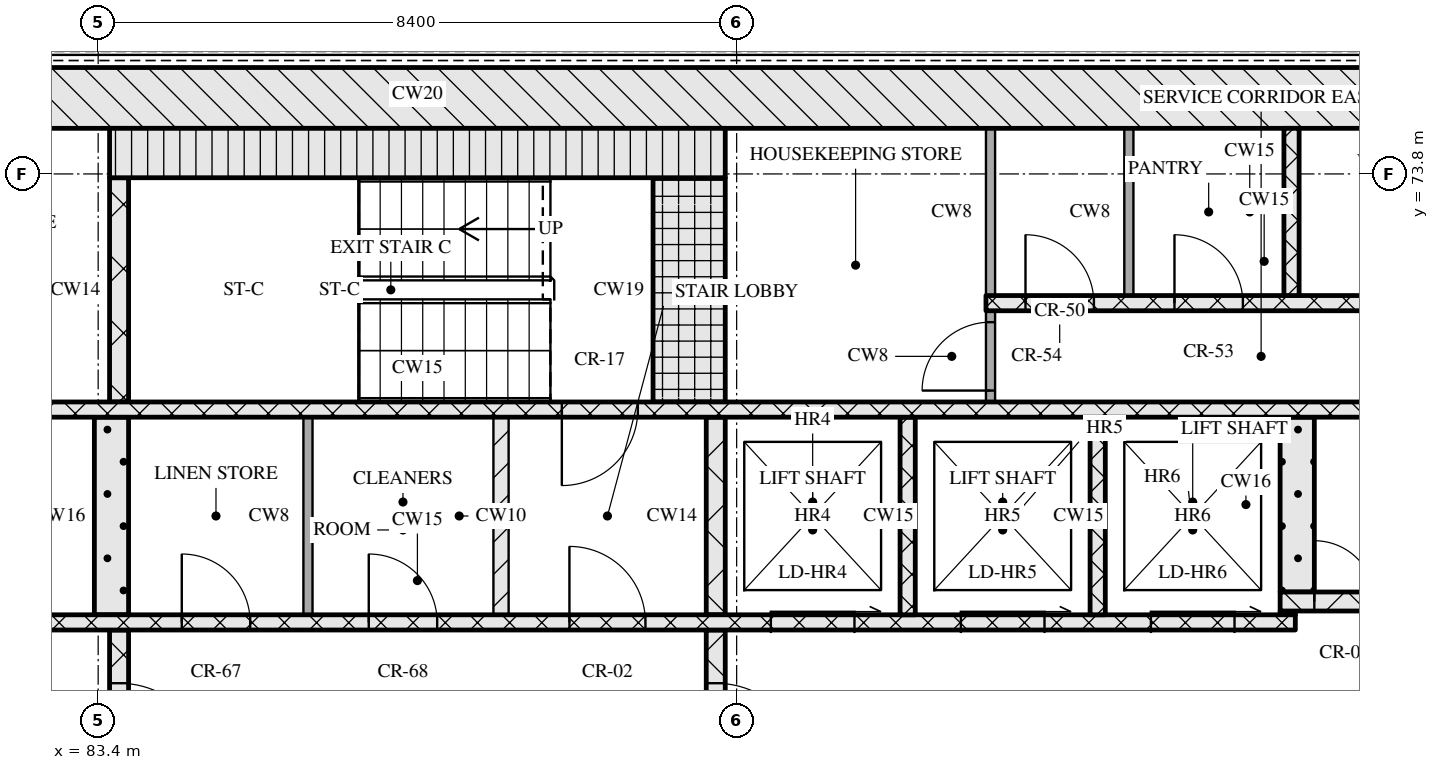
"""IFC4 building model, lengths in metres.
Left out: names, types, materials, properties, quantities, classifications, styles, units other than length and angle.
Written with IfcOpenShell. Run it as: python <this file> out.ifc"""

import sys

from ifc_helpers import new_model, si_unit, direction, frame, frame_2d, origin, place, context, subcontext, project, spatial, rectangle, extrude, element, fill, save


model = new_model("IFC4")
c1 = context("Model", 3, precision=1e-05, world=origin(), true_north=direction((0.0, 1.0)))
c2 = subcontext(c1, "Body", "Model", "MODEL_VIEW")
j1 = project(units=[si_unit("LENGTHUNIT", "METRE"), si_unit("PLANEANGLEUNIT", "RADIAN")], contexts=[c1])
p1 = place(None, origin())
s1 = spatial("IfcSite", under=j1, at=p1, CompositionType="ELEMENT")
p2 = place(p1, origin())
s2 = spatial("IfcBuilding", under=s1, at=p2, CompositionType="ELEMENT")
p3 = place(p2, frame((0.0, 0.0, 176.25)))
s3 = spatial("IfcBuildingStorey", under=s2, at=p3, CompositionType="ELEMENT", Elevation=176.25)
p4 = place(p3, frame((67.0, 74.8, 0.0), z_axis=(0.0, 0.0, 1.0), x_axis=(1.0, 0.0, 0.0)))
e1 = element("IfcWall", 1, at=p4, inside=s3, PredefinedType="SOLIDWALL", context=c2, shape_type="SweptSolid", body=[
    extrude(rectangle(XDim=41.2, YDim=0.8, at=frame_2d((20.6, 0.0))), origin(), (0.0, 0.0, 1.0), 3.32),
])
p5 = place(p3, frame((83.675, 65.2, 0.0), z_axis=(0.0, 0.0, 1.0), x_axis=(0.0, 1.0, 0.0)))
e2 = element("IfcWall", 2, at=p5, inside=s3, PredefinedType="SOLIDWALL", context=c2, shape_type="SweptSolid", body=[
    extrude(rectangle(XDim=2.6, YDim=0.25, at=frame_2d((1.3, 0.0))), origin(), (0.0, 0.0, 1.0), 3.32),
])
p6 = place(p5, frame((0.7, 0.0, 0.0)))
e3 = element("IfcOpeningElement", 3, at=p6, cuts=e2, PredefinedType="OPENING", context=c2, shape_type="SweptSolid", body=[
    extrude(rectangle(XDim=1.2, YDim=2.1, at=frame_2d((0.6, 1.05))), frame((0.0, 0.135, 0.0), z_axis=(0.0, -1.0, 0.0), x_axis=(1.0, 0.0, 0.0)), (0.0, 0.0, 1.0), 0.27),
])
p7 = place(p3, frame((91.525, 65.2, 0.0), z_axis=(0.0, 0.0, 1.0), x_axis=(0.0, 1.0, 0.0)))
e4 = element("IfcWall", 4, at=p7, inside=s3, PredefinedType="SOLIDWALL", context=c2, shape_type="SweptSolid", body=[
    extrude(rectangle(XDim=2.6, YDim=0.25, at=frame_2d((1.3, 0.0))), origin(), (0.0, 0.0, 1.0), 3.32),
])
p8 = place(p7, frame((0.7, 0.0, 0.0)))
e5 = element("IfcOpeningElement", 5, at=p8, cuts=e4, PredefinedType="OPENING", context=c2, shape_type="SweptSolid", body=[
    extrude(rectangle(XDim=1.2, YDim=2.1, at=frame_2d((0.6, 1.05))), frame((0.0, 0.135, 0.0), z_axis=(0.0, -1.0, 0.0), x_axis=(1.0, 0.0, 0.0)), (0.0, 0.0, 1.0), 0.27),
])
p9 = place(p3, frame((76.05, 67.9, 0.0), z_axis=(0.0, 0.0, 1.0), x_axis=(1.0, 0.0, 0.0)))
e6 = element("IfcWall", 6, at=p9, inside=s3, PredefinedType="SOLIDWALL", context=c2, shape_type="SweptSolid", body=[
    extrude(rectangle(XDim=23.1, YDim=0.2, at=frame_2d((11.55, 0.0))), origin(), (0.0, 0.0, 1.0), 3.32),
])
p10 = place(p9, frame((1.35, 0.0, 0.0)))
e7 = element("IfcOpeningElement", 7, at=p10, cuts=e6, PredefinedType="OPENING", context=c2, shape_type="SweptSolid", body=[
    extrude(rectangle(XDim=0.9, YDim=2.1, at=frame_2d((0.45, 1.05))), frame((0.0, 0.11, 0.0), z_axis=(0.0, -1.0, 0.0), x_axis=(1.0, 0.0, 0.0)), (0.0, 0.0, 1.0), 0.22),
])
p11 = place(p9, frame((5.06, 0.0, 0.0)))
e8 = element("IfcOpeningElement", 8, at=p11, cuts=e6, PredefinedType="OPENING", context=c2, shape_type="SweptSolid", body=[
    extrude(rectangle(XDim=0.9, YDim=2.1, at=frame_2d((0.45, 1.05))), frame((0.0, 0.11, 0.0), z_axis=(0.0, -1.0, 0.0), x_axis=(1.0, 0.0, 0.0)), (0.0, 0.0, 1.0), 0.22),
])
p12 = place(p9, frame((8.45, 0.0, 0.0)))
e9 = element("IfcOpeningElement", 9, at=p12, cuts=e6, PredefinedType="OPENING", context=c2, shape_type="SweptSolid", body=[
    extrude(rectangle(XDim=0.9, YDim=2.1, at=frame_2d((0.45, 1.05))), frame((0.0, 0.11, 0.0), z_axis=(0.0, -1.0, 0.0), x_axis=(1.0, 0.0, 0.0)), (0.0, 0.0, 1.0), 0.22),
])
p13 = place(p9, frame((10.91, 0.0, 0.0)))
e10 = element("IfcOpeningElement", 10, at=p13, cuts=e6, PredefinedType="OPENING", context=c2, shape_type="SweptSolid", body=[
    extrude(rectangle(XDim=0.9, YDim=2.1, at=frame_2d((0.45, 1.05))), frame((0.0, 0.11, 0.0), z_axis=(0.0, -1.0, 0.0), x_axis=(1.0, 0.0, 0.0)), (0.0, 0.0, 1.0), 0.22),
])
p14 = place(p9, frame((13.55, 0.0, 0.0)))
e11 = element("IfcOpeningElement", 11, at=p14, cuts=e6, PredefinedType="OPENING", context=c2, shape_type="SweptSolid", body=[
    extrude(rectangle(XDim=1.0, YDim=2.1, at=frame_2d((0.5, 1.05))), frame((0.0, 0.11, 0.0), z_axis=(0.0, -1.0, 0.0), x_axis=(1.0, 0.0, 0.0)), (0.0, 0.0, 1.0), 0.22),
])
p15 = place(p9, frame((16.2, 0.0, 0.0)))
e12 = element("IfcOpeningElement", 12, at=p15, cuts=e6, PredefinedType="OPENING", context=c2, shape_type="SweptSolid", body=[
    extrude(rectangle(XDim=1.1, YDim=2.1, at=frame_2d((0.55, 1.05))), frame((0.0, 0.11, 0.0), z_axis=(0.0, -1.0, 0.0), x_axis=(1.0, 0.0, 0.0)), (0.0, 0.0, 1.0), 0.22),
])
p16 = place(p9, frame((18.7, 0.0, 0.0)))
e13 = element("IfcOpeningElement", 13, at=p16, cuts=e6, PredefinedType="OPENING", context=c2, shape_type="SweptSolid", body=[
    extrude(rectangle(XDim=1.1, YDim=2.1, at=frame_2d((0.55, 1.05))), frame((0.0, 0.11, 0.0), z_axis=(0.0, -1.0, 0.0), x_axis=(1.0, 0.0, 0.0)), (0.0, 0.0, 1.0), 0.22),
])
p17 = place(p9, frame((21.2, 0.0, 0.0)))
e14 = element("IfcOpeningElement", 14, at=p17, cuts=e6, PredefinedType="OPENING", context=c2, shape_type="SweptSolid", body=[
    extrude(rectangle(XDim=1.1, YDim=2.1, at=frame_2d((0.55, 1.05))), frame((0.0, 0.11, 0.0), z_axis=(0.0, -1.0, 0.0), x_axis=(1.0, 0.0, 0.0)), (0.0, 0.0, 1.0), 0.22),
])
p18 = place(p3, frame((83.575, 68.0, 0.0), z_axis=(0.0, 0.0, 1.0), x_axis=(0.0, 1.0, 0.0)))
e15 = element("IfcWall", 15, at=p18, inside=s3, PredefinedType="SOLIDWALL", context=c2, shape_type="SweptSolid", body=[
    extrude(rectangle(XDim=2.6, YDim=0.45, at=frame_2d((1.3, 0.0))), origin(), (0.0, 0.0, 1.0), 3.32),
])
p19 = place(p3, frame((86.16, 68.0, 0.0), z_axis=(0.0, 0.0, 1.0), x_axis=(0.0, 1.0, 0.0)))
e16 = element("IfcWall", 16, at=p19, inside=s3, PredefinedType="PARTITIONING", context=c2, shape_type="SweptSolid", body=[
    extrude(rectangle(XDim=2.6, YDim=0.12, at=frame_2d((1.3, 0.0))), origin(), (0.0, 0.0, 1.0), 3.32),
])
p20 = place(p3, frame((88.7, 68.0, 0.0), z_axis=(0.0, 0.0, 1.0), x_axis=(0.0, 1.0, 0.0)))
e17 = element("IfcWall", 17, at=p20, inside=s3, PredefinedType="PARTITIONING", context=c2, shape_type="SweptSolid", body=[
    extrude(rectangle(XDim=2.6, YDim=0.2, at=frame_2d((1.3, 0.0))), origin(), (0.0, 0.0, 1.0), 3.32),
])
p21 = place(p3, frame((91.525, 68.0, 0.0), z_axis=(0.0, 0.0, 1.0), x_axis=(0.0, 1.0, 0.0)))
e18 = element("IfcWall", 18, at=p21, inside=s3, PredefinedType="SOLIDWALL", context=c2, shape_type="SweptSolid", body=[
    extrude(rectangle(XDim=2.6, YDim=0.25, at=frame_2d((1.3, 0.0))), origin(), (0.0, 0.0, 1.0), 3.32),
])
for number, where, z_axis, x_axis in (
    (19, (94.05, 68.0, 0.0), (0.0, 0.0, 1.0), (0.0, 1.0, 0.0)),
    (20, (96.55, 68.0, 0.0), (0.0, 0.0, 1.0), (0.0, 1.0, 0.0)),
):
    element("IfcWall", number, at=place(p3, frame(where, z_axis=z_axis, x_axis=x_axis)), inside=s3, PredefinedType="SOLIDWALL", context=c2, shape_type="SweptSolid", body=[
        extrude(rectangle(XDim=2.6, YDim=0.2, at=frame_2d((1.3, 0.0))), origin(), (0.0, 0.0, 1.0), 3.32),
    ])
p22 = place(p3, frame((98.95, 68.025, 0.0), z_axis=(0.0, 0.0, 1.0), x_axis=(1.0, 0.0, 0.0)))
e21 = element("IfcWall", 21, at=p22, inside=s3, PredefinedType="SOLIDWALL", context=c2, shape_type="SweptSolid", body=[
    extrude(rectangle(XDim=0.2, YDim=0.05, at=frame_2d((0.1, 0.0))), origin(), (0.0, 0.0, 1.0), 3.32),
])
p23 = place(p3, frame((98.95, 68.175, 0.0), z_axis=(0.0, 0.0, 1.0), x_axis=(1.0, 0.0, 0.0)))
e22 = element("IfcWall", 22, at=p23, inside=s3, PredefinedType="SOLIDWALL", context=c2, shape_type="SweptSolid", body=[
    extrude(rectangle(XDim=8.45, YDim=0.25, at=frame_2d((4.225, 0.0))), origin(), (0.0, 0.0, 1.0), 3.32),
])
p24 = place(p23, frame((0.45, 0.0, 0.0)))
e23 = element("IfcOpeningElement", 23, at=p24, cuts=e22, PredefinedType="OPENING", context=c2, shape_type="SweptSolid", body=[
    extrude(rectangle(XDim=0.8, YDim=2.1, at=frame_2d((0.4, 1.05))), frame((0.0, 0.135, 0.0), z_axis=(0.0, -1.0, 0.0), x_axis=(1.0, 0.0, 0.0)), (0.0, 0.0, 1.0), 0.27),
])
p25 = place(p23, frame((1.75, 0.0, 0.0)))
e24 = element("IfcOpeningElement", 24, at=p25, cuts=e22, PredefinedType="OPENING", context=c2, shape_type="SweptSolid", body=[
    extrude(rectangle(XDim=1.0, YDim=2.1, at=frame_2d((0.5, 1.05))), frame((0.0, 0.135, 0.0), z_axis=(0.0, -1.0, 0.0), x_axis=(1.0, 0.0, 0.0)), (0.0, 0.0, 1.0), 0.27),
])
p26 = place(p3, frame((99.175, 68.3, 0.0), z_axis=(0.0, 0.0, 1.0), x_axis=(0.0, 1.0, 0.0)))
e25 = element("IfcWall", 25, at=p26, inside=s3, PredefinedType="SOLIDWALL", context=c2, shape_type="SweptSolid", body=[
    extrude(rectangle(XDim=2.3, YDim=0.45, at=frame_2d((1.15, 0.0))), origin(), (0.0, 0.0, 1.0), 3.32),
])
p27 = place(p3, frame((67.8, 70.7, 0.0), z_axis=(0.0, 0.0, 1.0), x_axis=(1.0, 0.0, 0.0)))
e26 = element("IfcWall", 26, at=p27, inside=s3, PredefinedType="SOLIDWALL", context=c2, shape_type="SweptSolid", body=[
    extrude(rectangle(XDim=39.6, YDim=0.2, at=frame_2d((19.8, 0.0))), origin(), (0.0, 0.0, 1.0), 3.32),
])
p28 = place(p27, frame((0.65, 0.0, 0.0)))
e27 = element("IfcOpeningElement", 27, at=p28, cuts=e26, PredefinedType="OPENING", context=c2, shape_type="SweptSolid", body=[
    extrude(rectangle(XDim=1.1, YDim=2.1, at=frame_2d((0.55, 1.05))), frame((0.0, 0.11, 0.0), z_axis=(0.0, -1.0, 0.0), x_axis=(1.0, 0.0, 0.0)), (0.0, 0.0, 1.0), 0.22),
])
p29 = place(p27, frame((3.25, 0.0, 0.0)))
e28 = element("IfcOpeningElement", 28, at=p29, cuts=e26, PredefinedType="OPENING", context=c2, shape_type="SweptSolid", body=[
    extrude(rectangle(XDim=1.1, YDim=2.1, at=frame_2d((0.55, 1.05))), frame((0.0, 0.11, 0.0), z_axis=(0.0, -1.0, 0.0), x_axis=(1.0, 0.0, 0.0)), (0.0, 0.0, 1.0), 0.22),
])
p30 = place(p27, frame((5.9, 0.0, 0.0)))
e29 = element("IfcOpeningElement", 29, at=p30, cuts=e26, PredefinedType="OPENING", context=c2, shape_type="SweptSolid", body=[
    extrude(rectangle(XDim=1.0, YDim=2.1, at=frame_2d((0.5, 1.05))), frame((0.0, 0.11, 0.0), z_axis=(0.0, -1.0, 0.0), x_axis=(1.0, 0.0, 0.0)), (0.0, 0.0, 1.0), 0.22),
])
p31 = place(p27, frame((21.7, 0.0, 0.0)))
e30 = element("IfcOpeningElement", 30, at=p31, cuts=e26, PredefinedType="OPENING", context=c2, shape_type="SweptSolid", body=[
    extrude(rectangle(XDim=1.0, YDim=2.1, at=frame_2d((0.5, 1.05))), frame((0.0, 0.11, 0.0), z_axis=(0.0, -1.0, 0.0), x_axis=(1.0, 0.0, 0.0)), (0.0, 0.0, 1.0), 0.22),
])
p32 = place(p27, frame((32.7, 0.0, 0.0)))
e31 = element("IfcOpeningElement", 31, at=p32, cuts=e26, PredefinedType="OPENING", context=c2, shape_type="SweptSolid", body=[
    extrude(rectangle(XDim=1.0, YDim=2.1, at=frame_2d((0.5, 1.05))), frame((0.0, 0.11, 0.0), z_axis=(0.0, -1.0, 0.0), x_axis=(1.0, 0.0, 0.0)), (0.0, 0.0, 1.0), 0.22),
])
p33 = place(p27, frame((35.25, 0.0, 0.0)))
e32 = element("IfcOpeningElement", 32, at=p33, cuts=e26, PredefinedType="OPENING", context=c2, shape_type="SweptSolid", body=[
    extrude(rectangle(XDim=1.1, YDim=2.1, at=frame_2d((0.55, 1.05))), frame((0.0, 0.11, 0.0), z_axis=(0.0, -1.0, 0.0), x_axis=(1.0, 0.0, 0.0)), (0.0, 0.0, 1.0), 0.22),
])
p34 = place(p27, frame((37.85, 0.0, 0.0)))
e33 = element("IfcOpeningElement", 33, at=p34, cuts=e26, PredefinedType="OPENING", context=c2, shape_type="SweptSolid", body=[
    extrude(rectangle(XDim=1.1, YDim=2.1, at=frame_2d((0.55, 1.05))), frame((0.0, 0.11, 0.0), z_axis=(0.0, -1.0, 0.0), x_axis=(1.0, 0.0, 0.0)), (0.0, 0.0, 1.0), 0.22),
])
p35 = place(p3, frame((83.675, 70.8, 0.0), z_axis=(0.0, 0.0, 1.0), x_axis=(0.0, 1.0, 0.0)))
e34 = element("IfcWall", 34, at=p35, inside=s3, PredefinedType="SOLIDWALL", context=c2, shape_type="SweptSolid", body=[
    extrude(rectangle(XDim=2.95, YDim=0.25, at=frame_2d((1.475, 0.0))), origin(), (0.0, 0.0, 1.0), 3.32),
])
p36 = place(p3, frame((91.175, 70.8, 0.0), z_axis=(0.0, 0.0, 1.0), x_axis=(0.0, 1.0, 0.0)))
e35 = element("IfcWall", 35, at=p36, inside=s3, PredefinedType="SOLIDWALL", context=c2, shape_type="SweptSolid", body=[
    extrude(rectangle(XDim=2.95, YDim=0.95, at=frame_2d((1.475, 0.0))), origin(), (0.0, 0.0, 1.0), 3.32),
])
p37 = place(p3, frame((95.14, 70.8, 0.0), z_axis=(0.0, 0.0, 1.0), x_axis=(0.0, 1.0, 0.0)))
e36 = element("IfcWall", 36, at=p37, inside=s3, PredefinedType="PARTITIONING", context=c2, shape_type="SweptSolid", body=[
    extrude(rectangle(XDim=1.2, YDim=0.12, at=frame_2d((0.6, 0.0))), origin(), (0.0, 0.0, 1.0), 3.32),
])
p38 = place(p37, frame((0.15, 0.0, 0.0)))
e37 = element("IfcOpeningElement", 37, at=p38, cuts=e36, PredefinedType="OPENING", context=c2, shape_type="SweptSolid", body=[
    extrude(rectangle(XDim=0.9, YDim=2.1, at=frame_2d((0.45, 1.05))), frame((0.0, 0.07, 0.0), z_axis=(0.0, -1.0, 0.0), x_axis=(1.0, 0.0, 0.0)), (0.0, 0.0, 1.0), 0.14),
])
p39 = place(p3, frame((95.08, 72.1, 0.0), z_axis=(0.0, 0.0, 1.0), x_axis=(1.0, 0.0, 0.0)))
e38 = element("IfcWall", 38, at=p39, inside=s3, PredefinedType="SOLIDWALL", context=c2, shape_type="SweptSolid", body=[
    extrude(rectangle(XDim=7.32, YDim=0.2, at=frame_2d((3.66, 0.0))), origin(), (0.0, 0.0, 1.0), 3.32),
])
p40 = place(p39, frame((0.52, 0.0, 0.0)))
e39 = element("IfcOpeningElement", 39, at=p40, cuts=e38, PredefinedType="OPENING", context=c2, shape_type="SweptSolid", body=[
    extrude(rectangle(XDim=0.9, YDim=2.1, at=frame_2d((0.45, 1.05))), frame((0.0, 0.11, 0.0), z_axis=(0.0, -1.0, 0.0), x_axis=(1.0, 0.0, 0.0)), (0.0, 0.0, 1.0), 0.22),
])
p41 = place(p39, frame((2.48, 0.0, 0.0)))
e40 = element("IfcOpeningElement", 40, at=p41, cuts=e38, PredefinedType="OPENING", context=c2, shape_type="SweptSolid", body=[
    extrude(rectangle(XDim=0.9, YDim=2.1, at=frame_2d((0.45, 1.05))), frame((0.0, 0.11, 0.0), z_axis=(0.0, -1.0, 0.0), x_axis=(1.0, 0.0, 0.0)), (0.0, 0.0, 1.0), 0.22),
])
p42 = place(p39, frame((5.17, 0.0, 0.0)))
e41 = element("IfcOpeningElement", 41, at=p42, cuts=e38, PredefinedType="OPENING", context=c2, shape_type="SweptSolid", body=[
    extrude(rectangle(XDim=0.9, YDim=2.1, at=frame_2d((0.45, 1.05))), frame((0.0, 0.11, 0.0), z_axis=(0.0, -1.0, 0.0), x_axis=(1.0, 0.0, 0.0)), (0.0, 0.0, 1.0), 0.22),
])
for number, where, z_axis, x_axis in (
    (42, (95.14, 72.2, 0.0), (0.0, 0.0, 1.0), (0.0, 1.0, 0.0)),
    (43, (96.96, 72.2, 0.0), (0.0, 0.0, 1.0), (0.0, 1.0, 0.0)),
):
    element("IfcWall", number, at=place(p3, frame(where, z_axis=z_axis, x_axis=x_axis)), inside=s3, PredefinedType="PARTITIONING", context=c2, shape_type="SweptSolid", body=[
        extrude(rectangle(XDim=2.2, YDim=0.12, at=frame_2d((1.1, 0.0))), origin(), (0.0, 0.0, 1.0), 3.32),
    ])
p43 = place(p3, frame((99.1, 72.2, 0.0), z_axis=(0.0, 0.0, 1.0), x_axis=(0.0, 1.0, 0.0)))
e44 = element("IfcWall", 44, at=p43, inside=s3, PredefinedType="SOLIDWALL", context=c2, shape_type="SweptSolid", body=[
    extrude(rectangle(XDim=2.2, YDim=0.2, at=frame_2d((1.1, 0.0))), origin(), (0.0, 0.0, 1.0), 3.32),
])
p44 = place(p3, frame((83.55, 74.075, 0.0), z_axis=(0.0, 0.0, 1.0), x_axis=(1.0, 0.0, 0.0)))
e45 = element("IfcWall", 45, at=p44, inside=s3, PredefinedType="SOLIDWALL", context=c2, shape_type="SweptSolid", body=[
    extrude(rectangle(XDim=8.1, YDim=0.65, at=frame_2d((4.05, 0.0))), origin(), (0.0, 0.0, 1.0), 3.32),
])
p45 = place(p6, origin())
e46 = element("IfcDoor", 46, at=p45, inside=s3, OperationType="SINGLE_SWING_RIGHT", PredefinedType="DOOR", context=c2, shape_type="SweptSolid", body=[
    extrude(rectangle(XDim=1.2, YDim=2.1, at=frame_2d((0.6, 1.05))), frame((0.0, 0.025, 0.0), z_axis=(0.0, -1.0, 0.0), x_axis=(1.0, 0.0, 0.0)), (0.0, 0.0, 1.0), 0.05),
])
fill(e3, e46)
p46 = place(p8, origin())
e47 = element("IfcDoor", 47, at=p46, inside=s3, OperationType="SINGLE_SWING_RIGHT", PredefinedType="DOOR", context=c2, shape_type="SweptSolid", body=[
    extrude(rectangle(XDim=1.2, YDim=2.1, at=frame_2d((0.6, 1.05))), frame((0.0, 0.025, 0.0), z_axis=(0.0, -1.0, 0.0), x_axis=(1.0, 0.0, 0.0)), (0.0, 0.0, 1.0), 0.05),
])
fill(e5, e47)
p47 = place(p12, origin())
e48 = element("IfcDoor", 48, at=p47, inside=s3, OperationType="SINGLE_SWING_LEFT", PredefinedType="DOOR", context=c2, shape_type="SweptSolid", body=[
    extrude(rectangle(XDim=0.9, YDim=2.1, at=frame_2d((0.45, 1.05))), frame((0.0, 0.025, 0.0), z_axis=(0.0, -1.0, 0.0), x_axis=(1.0, 0.0, 0.0)), (0.0, 0.0, 1.0), 0.05),
])
fill(e9, e48)
p48 = place(p13, origin())
e49 = element("IfcDoor", 49, at=p48, inside=s3, OperationType="SINGLE_SWING_LEFT", PredefinedType="DOOR", context=c2, shape_type="SweptSolid", body=[
    extrude(rectangle(XDim=0.9, YDim=2.1, at=frame_2d((0.45, 1.05))), frame((0.0, 0.025, 0.0), z_axis=(0.0, -1.0, 0.0), x_axis=(1.0, 0.0, 0.0)), (0.0, 0.0, 1.0), 0.05),
])
fill(e10, e49)
p49 = place(p14, origin())
e50 = element("IfcDoor", 50, at=p49, inside=s3, OperationType="SINGLE_SWING_LEFT", PredefinedType="DOOR", context=c2, shape_type="SweptSolid", body=[
    extrude(rectangle(XDim=1.0, YDim=2.1, at=frame_2d((0.5, 1.05))), frame((0.0, 0.025, 0.0), z_axis=(0.0, -1.0, 0.0), x_axis=(1.0, 0.0, 0.0)), (0.0, 0.0, 1.0), 0.05),
])
fill(e11, e50)
p50 = place(p15, origin())
e51 = element("IfcDoor", 51, at=p50, inside=s3, OperationType="SLIDING_TO_RIGHT", PredefinedType="DOOR", context=c2, shape_type="SweptSolid", body=[
    extrude(rectangle(XDim=1.1, YDim=2.1, at=frame_2d((0.55, 1.05))), frame((0.0, 0.025, 0.0), z_axis=(0.0, -1.0, 0.0), x_axis=(1.0, 0.0, 0.0)), (0.0, 0.0, 1.0), 0.05),
])
fill(e12, e51)
p51 = place(p16, origin())
e52 = element("IfcDoor", 52, at=p51, inside=s3, OperationType="SLIDING_TO_RIGHT", PredefinedType="DOOR", context=c2, shape_type="SweptSolid", body=[
    extrude(rectangle(XDim=1.1, YDim=2.1, at=frame_2d((0.55, 1.05))), frame((0.0, 0.025, 0.0), z_axis=(0.0, -1.0, 0.0), x_axis=(1.0, 0.0, 0.0)), (0.0, 0.0, 1.0), 0.05),
])
fill(e13, e52)
p52 = place(p17, origin())
e53 = element("IfcDoor", 53, at=p52, inside=s3, OperationType="SLIDING_TO_RIGHT", PredefinedType="DOOR", context=c2, shape_type="SweptSolid", body=[
    extrude(rectangle(XDim=1.1, YDim=2.1, at=frame_2d((0.55, 1.05))), frame((0.0, 0.025, 0.0), z_axis=(0.0, -1.0, 0.0), x_axis=(1.0, 0.0, 0.0)), (0.0, 0.0, 1.0), 0.05),
])
fill(e14, e53)
p53 = place(p24, origin())
e54 = element("IfcDoor", 54, at=p53, inside=s3, OperationType="SINGLE_SWING_LEFT", PredefinedType="DOOR", context=c2, shape_type="SweptSolid", body=[
    extrude(rectangle(XDim=0.8, YDim=2.1, at=frame_2d((0.4, 1.05))), frame((0.0, 0.025, 0.0), z_axis=(0.0, -1.0, 0.0), x_axis=(1.0, 0.0, 0.0)), (0.0, 0.0, 1.0), 0.05),
])
fill(e23, e54)
p54 = place(p31, origin())
e55 = element("IfcDoor", 55, at=p54, inside=s3, OperationType="SINGLE_SWING_RIGHT", PredefinedType="DOOR", context=c2, shape_type="SweptSolid", body=[
    extrude(rectangle(XDim=1.0, YDim=2.1, at=frame_2d((0.5, 1.05))), frame((0.0, 0.025, 0.0), z_axis=(0.0, -1.0, 0.0), x_axis=(1.0, 0.0, 0.0)), (0.0, 0.0, 1.0), 0.05),
])
fill(e30, e55)
p55 = place(p38, origin())
e56 = element("IfcDoor", 56, at=p55, inside=s3, OperationType="SINGLE_SWING_LEFT", PredefinedType="DOOR", context=c2, shape_type="SweptSolid", body=[
    extrude(rectangle(XDim=0.9, YDim=2.1, at=frame_2d((0.45, 1.05))), frame((0.0, 0.025, 0.0), z_axis=(0.0, -1.0, 0.0), x_axis=(1.0, 0.0, 0.0)), (0.0, 0.0, 1.0), 0.05),
])
fill(e37, e56)
p56 = place(p40, origin())
e57 = element("IfcDoor", 57, at=p56, inside=s3, OperationType="SINGLE_SWING_LEFT", PredefinedType="DOOR", context=c2, shape_type="SweptSolid", body=[
    extrude(rectangle(XDim=0.9, YDim=2.1, at=frame_2d((0.45, 1.05))), frame((0.0, 0.025, 0.0), z_axis=(0.0, -1.0, 0.0), x_axis=(1.0, 0.0, 0.0)), (0.0, 0.0, 1.0), 0.05),
])
fill(e39, e57)
p57 = place(p41, origin())
e58 = element("IfcDoor", 58, at=p57, inside=s3, OperationType="SINGLE_SWING_LEFT", PredefinedType="DOOR", context=c2, shape_type="SweptSolid", body=[
    extrude(rectangle(XDim=0.9, YDim=2.1, at=frame_2d((0.45, 1.05))), frame((0.0, 0.025, 0.0), z_axis=(0.0, -1.0, 0.0), x_axis=(1.0, 0.0, 0.0)), (0.0, 0.0, 1.0), 0.05),
])
fill(e40, e58)
save(model, sys.argv[1])
